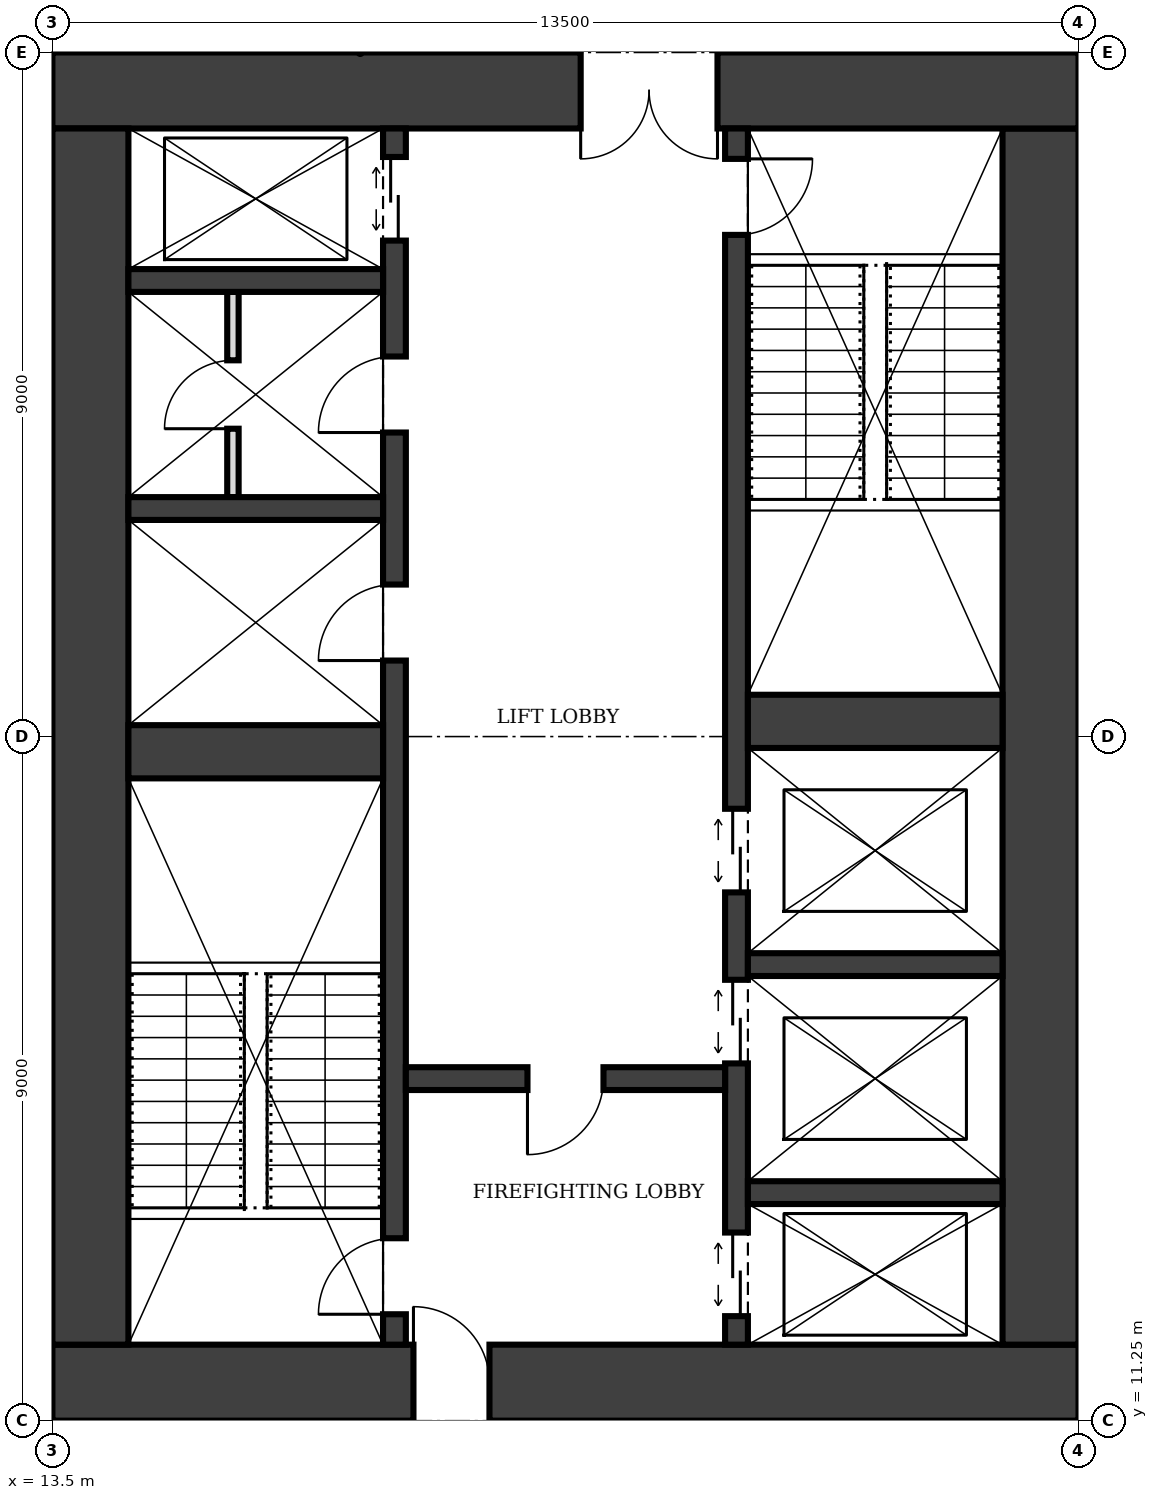
"""IFC4 building model, lengths in metres.
Left out: names, types, materials, properties, quantities, classifications, styles, units other than length and angle.
Written with IfcOpenShell. Run it as: python <this file> out.ifc"""

import sys

from ifc_helpers import new_model, si_unit, direction, frame, frame_2d, origin, place, context, subcontext, project, spatial, rectangle, extrude, element, fill, save


model = new_model("IFC4")
c1 = context("Model", 3, precision=1e-05, world=origin(), true_north=direction((0.0, 1.0)))
c2 = subcontext(c1, "Body", "Model", "MODEL_VIEW")
j1 = project(units=[si_unit("LENGTHUNIT", "METRE"), si_unit("PLANEANGLEUNIT", "RADIAN")], contexts=[c1])
p1 = place(None, origin())
s1 = spatial("IfcSite", under=j1, at=p1, CompositionType="ELEMENT")
p2 = place(p1, origin())
s2 = spatial("IfcBuilding", under=s1, at=p2, CompositionType="ELEMENT")
p3 = place(p2, frame((0.0, 0.0, 229.0)))
s3 = spatial("IfcBuildingStorey", under=s2, at=p3, CompositionType="ELEMENT", Elevation=229.0)
p4 = place(p3, frame((13.5, 11.75, 0.0), z_axis=(0.0, 0.0, 1.0), x_axis=(1.0, 0.0, 0.0)))
e1 = element("IfcWall", 1, at=p4, inside=s3, PredefinedType="SHEAR", context=c2, shape_type="SweptSolid", body=[
    extrude(rectangle(XDim=13.5, YDim=1.0, at=frame_2d((6.75, 0.0))), origin(), (0.0, 0.0, 1.0), 4.0),
])
p5 = place(p4, frame((4.75, 0.0, 0.0)))
e2 = element("IfcOpeningElement", 2, at=p5, cuts=e1, PredefinedType="OPENING", context=c2, shape_type="SweptSolid", body=[
    extrude(rectangle(XDim=1.0, YDim=2.1, at=frame_2d((0.5, 1.05))), frame((0.0, 0.51, 0.0), z_axis=(0.0, -1.0, 0.0), x_axis=(1.0, 0.0, 0.0)), (0.0, 0.0, 1.0), 1.02),
])
p6 = place(p3, frame((26.5, 12.25, 0.0), z_axis=(0.0, 0.0, 1.0), x_axis=(0.0, 1.0, 0.0)))
e3 = element("IfcWall", 3, at=p6, inside=s3, PredefinedType="SHEAR", context=c2, shape_type="SweptSolid", body=[
    extrude(rectangle(XDim=16.0, YDim=1.0, at=frame_2d((8.0, 0.0))), origin(), (0.0, 0.0, 1.0), 4.0),
])
p7 = place(p3, frame((27.0, 28.75, 0.0), z_axis=(0.0, 0.0, 1.0), x_axis=(-1.0, 0.0, 0.0)))
e4 = element("IfcWall", 4, at=p7, inside=s3, PredefinedType="SHEAR", context=c2, shape_type="SweptSolid", body=[
    extrude(rectangle(XDim=13.5, YDim=1.0, at=frame_2d((6.75, 0.0))), origin(), (0.0, 0.0, 1.0), 4.0),
])
p8 = place(p7, frame((4.75, 0.0, 0.0)))
e5 = element("IfcOpeningElement", 5, at=p8, cuts=e4, PredefinedType="OPENING", context=c2, shape_type="SweptSolid", body=[
    extrude(rectangle(XDim=1.8, YDim=2.1, at=frame_2d((0.9, 1.05))), frame((0.0, 0.51, 0.0), z_axis=(0.0, -1.0, 0.0), x_axis=(1.0, 0.0, 0.0)), (0.0, 0.0, 1.0), 1.02),
])
p9 = place(p3, frame((14.0, 28.25, 0.0), z_axis=(0.0, 0.0, 1.0), x_axis=(0.0, -1.0, 0.0)))
e6 = element("IfcWall", 6, at=p9, inside=s3, PredefinedType="SHEAR", context=c2, shape_type="SweptSolid", body=[
    extrude(rectangle(XDim=16.0, YDim=1.0, at=frame_2d((8.0, 0.0))), origin(), (0.0, 0.0, 1.0), 4.0),
])
p10 = place(p3, frame((18.0, 12.25, 0.0), z_axis=(0.0, 0.0, 1.0), x_axis=(0.0, 1.0, 0.0)))
e7 = element("IfcWall", 7, at=p10, inside=s3, PredefinedType="SHEAR", context=c2, shape_type="SweptSolid", body=[
    extrude(rectangle(XDim=16.0, YDim=0.3, at=frame_2d((8.0, 0.0))), origin(), (0.0, 0.0, 1.0), 4.0),
])
p11 = place(p10, frame((0.4, 0.0, 0.0)))
e8 = element("IfcOpeningElement", 8, at=p11, cuts=e7, PredefinedType="OPENING", context=c2, shape_type="SweptSolid", body=[
    extrude(rectangle(XDim=1.0, YDim=2.1, at=frame_2d((0.5, 1.05))), frame((0.0, 0.16, 0.0), z_axis=(0.0, -1.0, 0.0), x_axis=(1.0, 0.0, 0.0)), (0.0, 0.0, 1.0), 0.32),
])
p12 = place(p10, frame((14.525, 0.0, 0.0)))
e9 = element("IfcOpeningElement", 9, at=p12, cuts=e7, PredefinedType="OPENING", context=c2, shape_type="SweptSolid", body=[
    extrude(rectangle(XDim=1.1, YDim=2.1, at=frame_2d((0.55, 1.05))), frame((0.0, 0.16, 0.0), z_axis=(0.0, -1.0, 0.0), x_axis=(1.0, 0.0, 0.0)), (0.0, 0.0, 1.0), 0.32),
])
p13 = place(p10, frame((9.0, 0.0, 0.0)))
e10 = element("IfcOpeningElement", 10, at=p13, cuts=e7, PredefinedType="OPENING", context=c2, shape_type="SweptSolid", body=[
    extrude(rectangle(XDim=1.0, YDim=2.1, at=frame_2d((0.5, 1.05))), frame((0.0, 0.16, 0.0), z_axis=(0.0, -1.0, 0.0), x_axis=(1.0, 0.0, 0.0)), (0.0, 0.0, 1.0), 0.32),
])
p14 = place(p10, frame((12.0, 0.0, 0.0)))
e11 = element("IfcOpeningElement", 11, at=p14, cuts=e7, PredefinedType="OPENING", context=c2, shape_type="SweptSolid", body=[
    extrude(rectangle(XDim=1.0, YDim=2.1, at=frame_2d((0.5, 1.05))), frame((0.0, 0.16, 0.0), z_axis=(0.0, -1.0, 0.0), x_axis=(1.0, 0.0, 0.0)), (0.0, 0.0, 1.0), 0.32),
])
p15 = place(p3, frame((22.5, 12.25, 0.0), z_axis=(0.0, 0.0, 1.0), x_axis=(0.0, 1.0, 0.0)))
e12 = element("IfcWall", 12, at=p15, inside=s3, PredefinedType="SHEAR", context=c2, shape_type="SweptSolid", body=[
    extrude(rectangle(XDim=16.0, YDim=0.3, at=frame_2d((8.0, 0.0))), origin(), (0.0, 0.0, 1.0), 4.0),
])
p16 = place(p15, frame((14.6, 0.0, 0.0)))
e13 = element("IfcOpeningElement", 13, at=p16, cuts=e12, PredefinedType="OPENING", context=c2, shape_type="SweptSolid", body=[
    extrude(rectangle(XDim=1.0, YDim=2.1, at=frame_2d((0.5, 1.05))), frame((0.0, 0.16, 0.0), z_axis=(0.0, -1.0, 0.0), x_axis=(1.0, 0.0, 0.0)), (0.0, 0.0, 1.0), 0.32),
])
p17 = place(p15, frame((0.375, 0.0, 0.0)))
e14 = element("IfcOpeningElement", 14, at=p17, cuts=e12, PredefinedType="OPENING", context=c2, shape_type="SweptSolid", body=[
    extrude(rectangle(XDim=1.1, YDim=2.1, at=frame_2d((0.55, 1.05))), frame((0.0, 0.16, 0.0), z_axis=(0.0, -1.0, 0.0), x_axis=(1.0, 0.0, 0.0)), (0.0, 0.0, 1.0), 0.32),
])
p18 = place(p15, frame((3.7, 0.0, 0.0)))
e15 = element("IfcOpeningElement", 15, at=p18, cuts=e12, PredefinedType="OPENING", context=c2, shape_type="SweptSolid", body=[
    extrude(rectangle(XDim=1.1, YDim=2.1, at=frame_2d((0.55, 1.05))), frame((0.0, 0.16, 0.0), z_axis=(0.0, -1.0, 0.0), x_axis=(1.0, 0.0, 0.0)), (0.0, 0.0, 1.0), 0.32),
])
p19 = place(p15, frame((5.95, 0.0, 0.0)))
e16 = element("IfcOpeningElement", 16, at=p19, cuts=e12, PredefinedType="OPENING", context=c2, shape_type="SweptSolid", body=[
    extrude(rectangle(XDim=1.1, YDim=2.1, at=frame_2d((0.55, 1.05))), frame((0.0, 0.16, 0.0), z_axis=(0.0, -1.0, 0.0), x_axis=(1.0, 0.0, 0.0)), (0.0, 0.0, 1.0), 0.32),
])
p20 = place(p3, frame((14.5, 20.05, 0.0), z_axis=(0.0, 0.0, 1.0), x_axis=(1.0, 0.0, 0.0)))
e17 = element("IfcWall", 17, at=p20, inside=s3, PredefinedType="SHEAR", context=c2, shape_type="SweptSolid", body=[
    extrude(rectangle(XDim=3.35, YDim=0.7, at=frame_2d((1.675, 0.0))), origin(), (0.0, 0.0, 1.0), 4.0),
])
p21 = place(p3, frame((18.15, 15.75, 0.0), z_axis=(0.0, 0.0, 1.0), x_axis=(1.0, 0.0, 0.0)))
e18 = element("IfcWall", 18, at=p21, inside=s3, PredefinedType="SHEAR", context=c2, shape_type="SweptSolid", body=[
    extrude(rectangle(XDim=4.2, YDim=0.3, at=frame_2d((2.1, 0.0))), origin(), (0.0, 0.0, 1.0), 4.0),
])
p22 = place(p21, frame((1.6, 0.0, 0.0)))
e19 = element("IfcOpeningElement", 19, at=p22, cuts=e18, PredefinedType="OPENING", context=c2, shape_type="SweptSolid", body=[
    extrude(rectangle(XDim=1.0, YDim=2.1, at=frame_2d((0.5, 1.05))), frame((0.0, 0.16, 0.0), z_axis=(0.0, -1.0, 0.0), x_axis=(1.0, 0.0, 0.0)), (0.0, 0.0, 1.0), 0.32),
])
for number, where, z_axis, x_axis in (
    (20, (22.65, 14.25, 0.0), (0.0, 0.0, 1.0), (1.0, 0.0, 0.0)),
    (21, (22.65, 17.25, 0.0), (0.0, 0.0, 1.0), (1.0, 0.0, 0.0)),
):
    element("IfcWall", number, at=place(p3, frame(where, z_axis=z_axis, x_axis=x_axis)), inside=s3, PredefinedType="SHEAR", context=c2, shape_type="SweptSolid", body=[
        extrude(rectangle(XDim=3.35, YDim=0.3, at=frame_2d((1.675, 0.0))), origin(), (0.0, 0.0, 1.0), 4.0),
    ])
p23 = place(p3, frame((22.65, 20.45, 0.0), z_axis=(0.0, 0.0, 1.0), x_axis=(1.0, 0.0, 0.0)))
e22 = element("IfcWall", 22, at=p23, inside=s3, PredefinedType="SHEAR", context=c2, shape_type="SweptSolid", body=[
    extrude(rectangle(XDim=3.35, YDim=0.7, at=frame_2d((1.675, 0.0))), origin(), (0.0, 0.0, 1.0), 4.0),
])
for number, where, z_axis, x_axis in (
    (23, (14.5, 23.25, 0.0), (0.0, 0.0, 1.0), (1.0, 0.0, 0.0)),
    (24, (14.5, 26.25, 0.0), (0.0, 0.0, 1.0), (1.0, 0.0, 0.0)),
):
    element("IfcWall", number, at=place(p3, frame(where, z_axis=z_axis, x_axis=x_axis)), inside=s3, PredefinedType="SHEAR", context=c2, shape_type="SweptSolid", body=[
        extrude(rectangle(XDim=3.35, YDim=0.3, at=frame_2d((1.675, 0.0))), origin(), (0.0, 0.0, 1.0), 4.0),
    ])
p24 = place(p3, frame((15.875, 23.4, 0.0), z_axis=(0.0, 0.0, 1.0), x_axis=(0.0, 1.0, 0.0)))
e25 = element("IfcWall", 25, at=p24, inside=s3, PredefinedType="PARTITIONING", context=c2, shape_type="SweptSolid", body=[
    extrude(rectangle(XDim=2.7, YDim=0.15, at=frame_2d((1.35, 0.0))), origin(), (0.0, 0.0, 1.0), 3.75),
])
p25 = place(p24, frame((0.9, 0.0, 0.0)))
e26 = element("IfcOpeningElement", 26, at=p25, cuts=e25, PredefinedType="OPENING", context=c2, shape_type="SweptSolid", body=[
    extrude(rectangle(XDim=0.9, YDim=2.1, at=frame_2d((0.45, 1.05))), frame((0.0, 0.085, 0.0), z_axis=(0.0, -1.0, 0.0), x_axis=(1.0, 0.0, 0.0)), (0.0, 0.0, 1.0), 0.17),
])
p26 = place(p5, origin())
e27 = element("IfcDoor", 27, at=p26, inside=s3, OperationType="SINGLE_SWING_LEFT", PredefinedType="DOOR", context=c2, shape_type="SweptSolid", body=[
    extrude(rectangle(XDim=1.0, YDim=2.1, at=frame_2d((0.5, 1.05))), frame((0.0, 0.025, 0.0), z_axis=(0.0, -1.0, 0.0), x_axis=(1.0, 0.0, 0.0)), (0.0, 0.0, 1.0), 0.05),
])
fill(e2, e27)
p27 = place(p8, origin())
e28 = element("IfcDoor", 28, at=p27, inside=s3, OperationType="DOUBLE_DOOR_SINGLE_SWING", PredefinedType="DOOR", context=c2, shape_type="SweptSolid", body=[
    extrude(rectangle(XDim=1.8, YDim=2.1, at=frame_2d((0.9, 1.05))), frame((0.0, 0.025, 0.0), z_axis=(0.0, -1.0, 0.0), x_axis=(1.0, 0.0, 0.0)), (0.0, 0.0, 1.0), 0.05),
])
fill(e5, e28)
p28 = place(p22, frame((1.0, 0.0, 0.0), z_axis=(0.0, 0.0, 1.0), x_axis=(-1.0, 0.0, 0.0)))
e29 = element("IfcDoor", 29, at=p28, inside=s3, OperationType="SINGLE_SWING_RIGHT", PredefinedType="DOOR", context=c2, shape_type="SweptSolid", body=[
    extrude(rectangle(XDim=1.0, YDim=2.1, at=frame_2d((0.5, 1.05))), frame((0.0, 0.025, 0.0), z_axis=(0.0, -1.0, 0.0), x_axis=(1.0, 0.0, 0.0)), (0.0, 0.0, 1.0), 0.05),
])
fill(e19, e29)
p29 = place(p11, origin())
e30 = element("IfcDoor", 30, at=p29, inside=s3, OperationType="SINGLE_SWING_LEFT", PredefinedType="DOOR", context=c2, shape_type="SweptSolid", body=[
    extrude(rectangle(XDim=1.0, YDim=2.1, at=frame_2d((0.5, 1.05))), frame((0.0, 0.025, 0.0), z_axis=(0.0, -1.0, 0.0), x_axis=(1.0, 0.0, 0.0)), (0.0, 0.0, 1.0), 0.05),
])
fill(e8, e30)
p30 = place(p16, frame((1.0, 0.0, 0.0), z_axis=(0.0, 0.0, 1.0), x_axis=(-1.0, 0.0, 0.0)))
e31 = element("IfcDoor", 31, at=p30, inside=s3, OperationType="SINGLE_SWING_LEFT", PredefinedType="DOOR", context=c2, shape_type="SweptSolid", body=[
    extrude(rectangle(XDim=1.0, YDim=2.1, at=frame_2d((0.5, 1.05))), frame((0.0, 0.025, 0.0), z_axis=(0.0, -1.0, 0.0), x_axis=(1.0, 0.0, 0.0)), (0.0, 0.0, 1.0), 0.05),
])
fill(e13, e31)
p31 = place(p17, origin())
e32 = element("IfcDoor", 32, at=p31, inside=s3, OperationType="DOUBLE_DOOR_SLIDING", PredefinedType="DOOR", context=c2, shape_type="SweptSolid", body=[
    extrude(rectangle(XDim=1.1, YDim=2.1, at=frame_2d((0.55, 1.05))), frame((0.0, 0.025, 0.0), z_axis=(0.0, -1.0, 0.0), x_axis=(1.0, 0.0, 0.0)), (0.0, 0.0, 1.0), 0.05),
])
fill(e14, e32)
p32 = place(p12, origin())
e33 = element("IfcDoor", 33, at=p32, inside=s3, OperationType="DOUBLE_DOOR_SLIDING", PredefinedType="DOOR", context=c2, shape_type="SweptSolid", body=[
    extrude(rectangle(XDim=1.1, YDim=2.1, at=frame_2d((0.55, 1.05))), frame((0.0, 0.025, 0.0), z_axis=(0.0, -1.0, 0.0), x_axis=(1.0, 0.0, 0.0)), (0.0, 0.0, 1.0), 0.05),
])
fill(e9, e33)
p33 = place(p18, origin())
e34 = element("IfcDoor", 34, at=p33, inside=s3, OperationType="DOUBLE_DOOR_SLIDING", PredefinedType="DOOR", context=c2, shape_type="SweptSolid", body=[
    extrude(rectangle(XDim=1.1, YDim=2.1, at=frame_2d((0.55, 1.05))), frame((0.0, 0.025, 0.0), z_axis=(0.0, -1.0, 0.0), x_axis=(1.0, 0.0, 0.0)), (0.0, 0.0, 1.0), 0.05),
])
fill(e15, e34)
p34 = place(p19, origin())
e35 = element("IfcDoor", 35, at=p34, inside=s3, OperationType="DOUBLE_DOOR_SLIDING", PredefinedType="DOOR", context=c2, shape_type="SweptSolid", body=[
    extrude(rectangle(XDim=1.1, YDim=2.1, at=frame_2d((0.55, 1.05))), frame((0.0, 0.025, 0.0), z_axis=(0.0, -1.0, 0.0), x_axis=(1.0, 0.0, 0.0)), (0.0, 0.0, 1.0), 0.05),
])
fill(e16, e35)
p35 = place(p13, origin())
e36 = element("IfcDoor", 36, at=p35, inside=s3, OperationType="SINGLE_SWING_LEFT", PredefinedType="DOOR", context=c2, shape_type="SweptSolid", body=[
    extrude(rectangle(XDim=1.0, YDim=2.1, at=frame_2d((0.5, 1.05))), frame((0.0, 0.025, 0.0), z_axis=(0.0, -1.0, 0.0), x_axis=(1.0, 0.0, 0.0)), (0.0, 0.0, 1.0), 0.05),
])
fill(e10, e36)
p36 = place(p14, origin())
e37 = element("IfcDoor", 37, at=p36, inside=s3, OperationType="SINGLE_SWING_LEFT", PredefinedType="DOOR", context=c2, shape_type="SweptSolid", body=[
    extrude(rectangle(XDim=1.0, YDim=2.1, at=frame_2d((0.5, 1.05))), frame((0.0, 0.025, 0.0), z_axis=(0.0, -1.0, 0.0), x_axis=(1.0, 0.0, 0.0)), (0.0, 0.0, 1.0), 0.05),
])
fill(e11, e37)
p37 = place(p25, origin())
e38 = element("IfcDoor", 38, at=p37, inside=s3, OperationType="SINGLE_SWING_LEFT", PredefinedType="DOOR", context=c2, shape_type="SweptSolid", body=[
    extrude(rectangle(XDim=0.9, YDim=2.1, at=frame_2d((0.45, 1.05))), frame((0.0, 0.025, 0.0), z_axis=(0.0, -1.0, 0.0), x_axis=(1.0, 0.0, 0.0)), (0.0, 0.0, 1.0), 0.05),
])
fill(e26, e38)
save(model, sys.argv[1])
